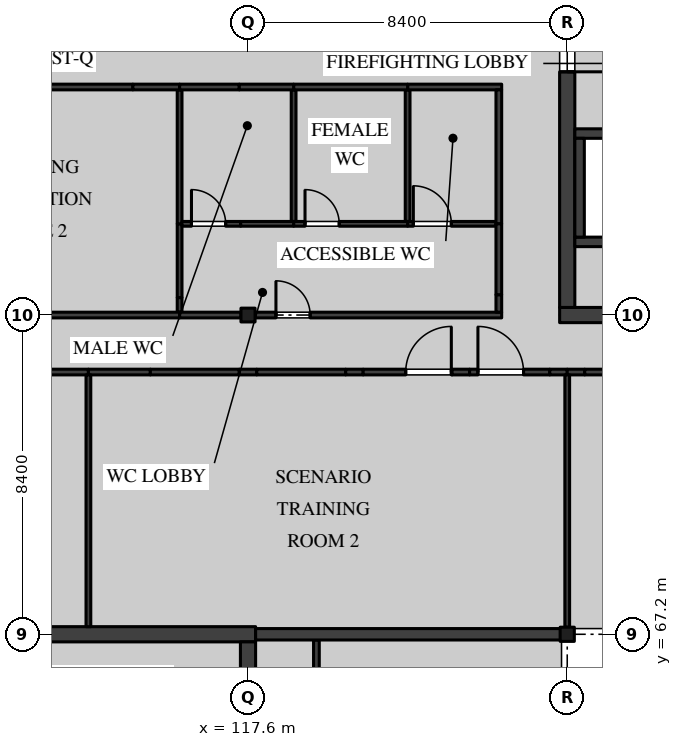
"""IFC4 building model, lengths in metres.
Left out: names, types, materials, properties, quantities, classifications, styles, units other than length and angle.
Written with IfcOpenShell. Run it as: python <this file> out.ifc"""

import sys

from ifc_helpers import new_model, si_unit, direction, frame, frame_2d, origin, origin_2d, place, context, subcontext, project, spatial, rectangle, i_section, extrude, element, fill, save


model = new_model("IFC4")
c1 = context("Model", 3, precision=1e-05, world=origin(), true_north=direction((0.0, 1.0)))
c2 = subcontext(c1, "Body", "Model", "MODEL_VIEW")
j1 = project(units=[si_unit("LENGTHUNIT", "METRE"), si_unit("PLANEANGLEUNIT", "RADIAN")], contexts=[c1])
p1 = place(None, origin())
s1 = spatial("IfcSite", under=j1, at=p1, CompositionType="ELEMENT")
p2 = place(p1, origin())
s2 = spatial("IfcBuilding", under=s1, at=p2, CompositionType="ELEMENT")
p3 = place(p2, frame((0.0, 0.0, 14.4)))
s3 = spatial("IfcBuildingStorey", under=s2, at=p3, CompositionType="ELEMENT", Elevation=14.4)
p4 = place(p3, frame((117.6, 75.6, 0.0), z_axis=(0.0, 0.0, 1.0), x_axis=(1.0, 0.0, 0.0)))
e1 = element("IfcColumn", 1, at=p4, inside=s3, PredefinedType="COLUMN", context=c2, shape_type="SweptSolid", body=[
    extrude(i_section(OverallWidth=0.371, OverallDepth=0.363, WebThickness=0.013, FlangeThickness=0.022, FilletRadius=0.015, at=origin_2d()), origin(), (0.0, 0.0, 1.0), 4.37),
])
p5 = place(p3, frame((126.0, 67.2, 0.0), z_axis=(0.0, 0.0, 1.0), x_axis=(1.0, 0.0, 0.0)))
e2 = element("IfcColumn", 2, at=p5, inside=s3, PredefinedType="COLUMN", context=c2, shape_type="SweptSolid", body=[
    extrude(i_section(OverallWidth=0.373, OverallDepth=0.373, WebThickness=0.016, FlangeThickness=0.026, FilletRadius=0.015, at=origin_2d()), origin(), (0.0, 0.0, 1.0), 4.37),
])
p6 = place(p3, frame((109.0, 67.2, 0.0), z_axis=(0.0, 0.0, 1.0), x_axis=(1.0, 0.0, 0.0)))
e3 = element("IfcWall", 3, at=p6, inside=s3, PredefinedType="SHEAR", context=c2, shape_type="SweptSolid", body=[
    extrude(rectangle(XDim=8.8, YDim=0.4, at=frame_2d((4.4, 0.0))), origin(), (0.0, 0.0, 1.0), 4.37),
])
p7 = place(p3, frame((117.6, 59.0, 0.0), z_axis=(0.0, 0.0, 1.0), x_axis=(0.0, 1.0, 0.0)))
e4 = element("IfcWall", 4, at=p7, inside=s3, PredefinedType="SHEAR", context=c2, shape_type="SweptSolid", body=[
    extrude(rectangle(XDim=8.0, YDim=0.4, at=frame_2d((4.0, 0.0))), origin(), (0.0, 0.0, 1.0), 4.37),
])
p8 = place(p7, frame((2.925, 0.0, 0.0)))
e5 = element("IfcOpeningElement", 5, at=p8, cuts=e4, PredefinedType="OPENING", context=c2, shape_type="SweptSolid", body=[
    extrude(rectangle(XDim=1.2, YDim=2.1, at=frame_2d((0.6, 1.05))), frame((0.0, 0.21, 0.0), z_axis=(0.0, -1.0, 0.0), x_axis=(1.0, 0.0, 0.0)), (0.0, 0.0, 1.0), 0.42),
])
p9 = place(p3, frame((125.8, 75.6, 0.0), z_axis=(0.0, 0.0, 1.0), x_axis=(1.0, 0.0, 0.0)))
e6 = element("IfcWall", 6, at=p9, inside=s3, PredefinedType="SHEAR", context=c2, shape_type="SweptSolid", body=[
    extrude(rectangle(XDim=8.8, YDim=0.4, at=frame_2d((4.4, 0.0))), origin(), (0.0, 0.0, 1.0), 4.37),
])
p10 = place(p3, frame((126.0, 75.8, 0.0), z_axis=(0.0, 0.0, 1.0), x_axis=(0.0, 1.0, 0.0)))
e7 = element("IfcWall", 7, at=p10, inside=s3, PredefinedType="SHEAR", context=c2, shape_type="SweptSolid", body=[
    extrude(rectangle(XDim=8.0, YDim=0.4, at=frame_2d((4.0, 0.0))), origin(), (0.0, 0.0, 1.0), 4.37),
])
p11 = place(p10, frame((6.2, 0.0, 0.0)))
e8 = element("IfcOpeningElement", 8, at=p11, cuts=e7, PredefinedType="OPENING", context=c2, shape_type="SweptSolid", body=[
    extrude(rectangle(XDim=1.2, YDim=2.1, at=frame_2d((0.6, 1.05))), frame((0.0, 0.21, 0.0), z_axis=(0.0, -1.0, 0.0), x_axis=(1.0, 0.0, 0.0)), (0.0, 0.0, 1.0), 0.42),
])
p12 = place(p3, frame((126.2, 80.375, 0.0), z_axis=(0.0, 0.0, 1.0), x_axis=(1.0, 0.0, 0.0)))
e9 = element("IfcWall", 9, at=p12, inside=s3, PredefinedType="SOLIDWALL", context=c2, shape_type="SweptSolid", body=[
    extrude(rectangle(XDim=3.05, YDim=0.25, at=frame_2d((1.525, 0.0))), origin(), (0.0, 0.0, 1.0), 4.37),
])
p13 = place(p12, frame((0.975, 0.0, 0.0)))
e10 = element("IfcOpeningElement", 10, at=p13, cuts=e9, PredefinedType="OPENING", context=c2, shape_type="SweptSolid", body=[
    extrude(rectangle(XDim=1.1, YDim=2.1, at=frame_2d((0.55, 1.05))), frame((0.0, 0.135, 0.0), z_axis=(0.0, -1.0, 0.0), x_axis=(1.0, 0.0, 0.0)), (0.0, 0.0, 1.0), 0.27),
])
p14 = place(p3, frame((126.2, 77.525, 0.0), z_axis=(0.0, 0.0, 1.0), x_axis=(1.0, 0.0, 0.0)))
e11 = element("IfcWall", 11, at=p14, inside=s3, PredefinedType="SOLIDWALL", context=c2, shape_type="SweptSolid", body=[
    extrude(rectangle(XDim=3.05, YDim=0.25, at=frame_2d((1.525, 0.0))), origin(), (0.0, 0.0, 1.0), 4.37),
])
p15 = place(p3, frame((126.325, 77.65, 0.0), z_axis=(0.0, 0.0, 1.0), x_axis=(0.0, 1.0, 0.0)))
e12 = element("IfcWall", 12, at=p15, inside=s3, PredefinedType="SOLIDWALL", context=c2, shape_type="SweptSolid", body=[
    extrude(rectangle(XDim=2.6, YDim=0.25, at=frame_2d((1.3, 0.0))), origin(), (0.0, 0.0, 1.0), 4.37),
])
p16 = place(p3, frame((119.4, 59.03, 0.0), z_axis=(0.0, 0.0, 1.0), x_axis=(0.0, 1.0, 0.0)))
e13 = element("IfcWall", 13, at=p16, inside=s3, PredefinedType="PARTITIONING", context=c2, shape_type="SweptSolid", body=[
    extrude(rectangle(XDim=8.02, YDim=0.15, at=frame_2d((4.01, 0.0))), origin(), (0.0, 0.0, 1.0), 4.37),
])
p17 = place(p16, frame((0.17, 0.0, 0.0)))
e14 = element("IfcOpeningElement", 14, at=p17, cuts=e13, PredefinedType="OPENING", context=c2, shape_type="SweptSolid", body=[
    extrude(rectangle(XDim=1.35, YDim=2.1, at=frame_2d((0.675, 1.05))), frame((0.0, 0.085, 0.0), z_axis=(0.0, -1.0, 0.0), x_axis=(1.0, 0.0, 0.0)), (0.0, 0.0, 1.0), 0.17),
])
p18 = place(p3, frame((115.8, 75.675, 0.0), z_axis=(0.0, 0.0, 1.0), x_axis=(0.0, 1.0, 0.0)))
e15 = element("IfcWall", 15, at=p18, inside=s3, PredefinedType="PARTITIONING", context=c2, shape_type="SweptSolid", body=[
    extrude(rectangle(XDim=0.385, YDim=0.125, at=frame_2d((0.192, 0.0))), origin(), (0.0, 0.0, 1.0), 3.746),
])
p19 = place(p3, frame((115.8, 76.06, 0.0), z_axis=(0.0, 0.0, 1.0), x_axis=(0.0, 1.0, 0.0)))
e16 = element("IfcWall", 16, at=p19, inside=s3, PredefinedType="PARTITIONING", context=c2, shape_type="SweptSolid", body=[
    extrude(rectangle(XDim=1.94, YDim=0.125, at=frame_2d((0.97, 0.0))), origin(), (0.0, 0.0, 1.0), 4.37),
])
p20 = place(p3, frame((115.8, 78.0, 0.0), z_axis=(0.0, 0.0, 1.0), x_axis=(0.0, 1.0, 0.0)))
e17 = element("IfcWall", 17, at=p20, inside=s3, PredefinedType="PARTITIONING", context=c2, shape_type="SweptSolid", body=[
    extrude(rectangle(XDim=3.525, YDim=0.125, at=frame_2d((1.762, 0.0))), origin(), (0.0, 0.0, 1.0), 4.37),
])
p21 = place(p3, frame((109.386, 75.6, 0.0), z_axis=(0.0, 0.0, 1.0), x_axis=(1.0, 0.0, 0.0)))
e18 = element("IfcWall", 18, at=p21, inside=s3, PredefinedType="PARTITIONING", context=c2, shape_type="SweptSolid", body=[
    extrude(rectangle(XDim=6.414, YDim=0.15, at=frame_2d((3.207, 0.0))), origin(), (0.0, 0.0, 1.0), 3.746),
])
p22 = place(p3, frame((112.23, 81.6, 0.0), z_axis=(0.0, 0.0, 1.0), x_axis=(1.0, 0.0, 0.0)))
e19 = element("IfcWall", 19, at=p22, inside=s3, PredefinedType="PARTITIONING", context=c2, shape_type="SweptSolid", body=[
    extrude(rectangle(XDim=2.34, YDim=0.15, at=frame_2d((1.17, 0.0))), origin(), (0.0, 0.0, 1.0), 4.37),
])
p23 = place(p3, frame((114.57, 81.6, 0.0), z_axis=(0.0, 0.0, 1.0), x_axis=(1.0, 0.0, 0.0)))
e20 = element("IfcWall", 20, at=p23, inside=s3, PredefinedType="PARTITIONING", context=c2, shape_type="SweptSolid", body=[
    extrude(rectangle(XDim=1.23, YDim=0.15, at=frame_2d((0.615, 0.0))), origin(), (0.0, 0.0, 1.0), 3.895),
])
p24 = place(p3, frame((121.8, 78.062, 0.0), z_axis=(0.0, 0.0, 1.0), x_axis=(0.0, 1.0, 0.0)))
e21 = element("IfcWall", 21, at=p24, inside=s3, PredefinedType="PARTITIONING", context=c2, shape_type="SweptSolid", body=[
    extrude(rectangle(XDim=3.463, YDim=0.125, at=frame_2d((1.731, 0.0))), origin(), (0.0, 0.0, 1.0), 4.37),
])
p25 = place(p3, frame((121.8, 78.0, 0.0), z_axis=(0.0, 0.0, 1.0), x_axis=(1.0, 0.0, 0.0)))
e22 = element("IfcWall", 22, at=p25, inside=s3, PredefinedType="PARTITIONING", context=c2, shape_type="SweptSolid", body=[
    extrude(rectangle(XDim=2.325, YDim=0.125, at=frame_2d((1.163, 0.0))), origin(), (0.0, 0.0, 1.0), 3.895),
])
p26 = place(p25, frame((0.15, 0.0, 0.0)))
e23 = element("IfcOpeningElement", 23, at=p26, cuts=e22, PredefinedType="OPENING", context=c2, shape_type="SweptSolid", body=[
    extrude(rectangle(XDim=1.0, YDim=2.1, at=frame_2d((0.5, 1.05))), frame((0.0, 0.073, 0.0), z_axis=(0.0, -1.0, 0.0), x_axis=(1.0, 0.0, 0.0)), (0.0, 0.0, 1.0), 0.145),
])
p27 = place(p3, frame((121.8, 81.6, 0.0), z_axis=(0.0, 0.0, 1.0), x_axis=(1.0, 0.0, 0.0)))
e24 = element("IfcWall", 24, at=p27, inside=s3, PredefinedType="PARTITIONING", context=c2, shape_type="SweptSolid", body=[
    extrude(rectangle(XDim=2.475, YDim=0.15, at=frame_2d((1.237, 0.0))), origin(), (0.0, 0.0, 1.0), 3.895),
])
p28 = place(p3, frame((124.2, 78.0, 0.0), z_axis=(0.0, 0.0, 1.0), x_axis=(0.0, 1.0, 0.0)))
e25 = element("IfcWall", 25, at=p28, inside=s3, PredefinedType="PARTITIONING", context=c2, shape_type="SweptSolid", body=[
    extrude(rectangle(XDim=3.525, YDim=0.15, at=frame_2d((1.762, 0.0))), origin(), (0.0, 0.0, 1.0), 4.37),
])
p29 = place(p3, frame((118.8, 78.0, 0.0), z_axis=(0.0, 0.0, 1.0), x_axis=(1.0, 0.0, 0.0)))
e26 = element("IfcWall", 26, at=p29, inside=s3, PredefinedType="PARTITIONING", context=c2, shape_type="SweptSolid", body=[
    extrude(rectangle(XDim=3.0, YDim=0.125, at=frame_2d((1.5, 0.0))), origin(), (0.0, 0.0, 1.0), 3.895),
])
p30 = place(p29, frame((0.3, 0.0, 0.0)))
e27 = element("IfcOpeningElement", 27, at=p30, cuts=e26, PredefinedType="OPENING", context=c2, shape_type="SweptSolid", body=[
    extrude(rectangle(XDim=0.9, YDim=2.1, at=frame_2d((0.45, 1.05))), frame((0.0, 0.073, 0.0), z_axis=(0.0, -1.0, 0.0), x_axis=(1.0, 0.0, 0.0)), (0.0, 0.0, 1.0), 0.145),
])
p31 = place(p3, frame((118.8, 78.062, 0.0), z_axis=(0.0, 0.0, 1.0), x_axis=(0.0, 1.0, 0.0)))
e28 = element("IfcWall", 28, at=p31, inside=s3, PredefinedType="PARTITIONING", context=c2, shape_type="SweptSolid", body=[
    extrude(rectangle(XDim=3.463, YDim=0.125, at=frame_2d((1.731, 0.0))), origin(), (0.0, 0.0, 1.0), 4.37),
])
p32 = place(p3, frame((118.8, 81.6, 0.0), z_axis=(0.0, 0.0, 1.0), x_axis=(1.0, 0.0, 0.0)))
e29 = element("IfcWall", 29, at=p32, inside=s3, PredefinedType="PARTITIONING", context=c2, shape_type="SweptSolid", body=[
    extrude(rectangle(XDim=3.0, YDim=0.15, at=frame_2d((1.5, 0.0))), origin(), (0.0, 0.0, 1.0), 3.895),
])
p33 = place(p3, frame((115.862, 78.0, 0.0), z_axis=(0.0, 0.0, 1.0), x_axis=(1.0, 0.0, 0.0)))
e30 = element("IfcWall", 30, at=p33, inside=s3, PredefinedType="PARTITIONING", context=c2, shape_type="SweptSolid", body=[
    extrude(rectangle(XDim=1.545, YDim=0.125, at=frame_2d((0.772, 0.0))), origin(), (0.0, 0.0, 1.0), 4.37),
])
p34 = place(p33, frame((0.25, 0.0, 0.0)))
e31 = element("IfcOpeningElement", 31, at=p34, cuts=e30, PredefinedType="OPENING", context=c2, shape_type="SweptSolid", body=[
    extrude(rectangle(XDim=0.9, YDim=2.1, at=frame_2d((0.45, 1.05))), frame((0.0, 0.073, 0.0), z_axis=(0.0, -1.0, 0.0), x_axis=(1.0, 0.0, 0.0)), (0.0, 0.0, 1.0), 0.145),
])
p35 = place(p3, frame((117.407, 78.0, 0.0), z_axis=(0.0, 0.0, 1.0), x_axis=(1.0, 0.0, 0.0)))
e32 = element("IfcWall", 32, at=p35, inside=s3, PredefinedType="PARTITIONING", context=c2, shape_type="SweptSolid", body=[
    extrude(rectangle(XDim=1.393, YDim=0.125, at=frame_2d((0.697, 0.0))), origin(), (0.0, 0.0, 1.0), 3.746),
])
p36 = place(p3, frame((115.8, 75.6, 0.0), z_axis=(0.0, 0.0, 1.0), x_axis=(1.0, 0.0, 0.0)))
e33 = element("IfcWall", 33, at=p36, inside=s3, PredefinedType="PARTITIONING", context=c2, shape_type="SweptSolid", body=[
    extrude(rectangle(XDim=1.614, YDim=0.15, at=frame_2d((0.807, 0.0))), origin(), (0.0, 0.0, 1.0), 3.746),
])
p37 = place(p3, frame((117.785, 75.6, 0.0), z_axis=(0.0, 0.0, 1.0), x_axis=(1.0, 0.0, 0.0)))
e34 = element("IfcWall", 34, at=p37, inside=s3, PredefinedType="PARTITIONING", context=c2, shape_type="SweptSolid", body=[
    extrude(rectangle(XDim=6.49, YDim=0.15, at=frame_2d((3.245, 0.0))), origin(), (0.0, 0.0, 1.0), 3.746),
])
p38 = place(p37, frame((0.55, 0.0, 0.0)))
e35 = element("IfcOpeningElement", 35, at=p38, cuts=e34, PredefinedType="OPENING", context=c2, shape_type="SweptSolid", body=[
    extrude(rectangle(XDim=0.9, YDim=2.1, at=frame_2d((0.45, 1.05))), frame((0.0, 0.085, 0.0), z_axis=(0.0, -1.0, 0.0), x_axis=(1.0, 0.0, 0.0)), (0.0, 0.0, 1.0), 0.17),
])
p39 = place(p3, frame((124.2, 75.675, 0.0), z_axis=(0.0, 0.0, 1.0), x_axis=(0.0, 1.0, 0.0)))
e36 = element("IfcWall", 36, at=p39, inside=s3, PredefinedType="PARTITIONING", context=c2, shape_type="SweptSolid", body=[
    extrude(rectangle(XDim=0.46, YDim=0.15, at=frame_2d((0.23, 0.0))), origin(), (0.0, 0.0, 1.0), 3.746),
])
p40 = place(p3, frame((124.2, 76.135, 0.0), z_axis=(0.0, 0.0, 1.0), x_axis=(0.0, 1.0, 0.0)))
e37 = element("IfcWall", 37, at=p40, inside=s3, PredefinedType="PARTITIONING", context=c2, shape_type="SweptSolid", body=[
    extrude(rectangle(XDim=1.865, YDim=0.15, at=frame_2d((0.933, 0.0))), origin(), (0.0, 0.0, 1.0), 4.37),
])
p41 = place(p3, frame((115.8, 81.6, 0.0), z_axis=(0.0, 0.0, 1.0), x_axis=(1.0, 0.0, 0.0)))
e38 = element("IfcWall", 38, at=p41, inside=s3, PredefinedType="PARTITIONING", context=c2, shape_type="SweptSolid", body=[
    extrude(rectangle(XDim=1.57, YDim=0.15, at=frame_2d((0.785, 0.0))), origin(), (0.0, 0.0, 1.0), 4.37),
])
p42 = place(p3, frame((117.37, 81.6, 0.0), z_axis=(0.0, 0.0, 1.0), x_axis=(1.0, 0.0, 0.0)))
e39 = element("IfcWall", 39, at=p42, inside=s3, PredefinedType="PARTITIONING", context=c2, shape_type="SweptSolid", body=[
    extrude(rectangle(XDim=1.43, YDim=0.15, at=frame_2d((0.715, 0.0))), origin(), (0.0, 0.0, 1.0), 3.746),
])
p43 = place(p3, frame((111.77, 74.1, 0.0), z_axis=(0.0, 0.0, 1.0), x_axis=(1.0, 0.0, 0.0)))
e40 = element("IfcWall", 40, at=p43, inside=s3, PredefinedType="PARTITIONING", context=c2, shape_type="SweptSolid", body=[
    extrude(rectangle(XDim=1.63, YDim=0.15, at=frame_2d((0.815, 0.0))), origin(), (0.0, 0.0, 1.0), 3.895),
])
p44 = place(p3, frame((113.4, 74.1, 0.0), z_axis=(0.0, 0.0, 1.0), x_axis=(1.0, 0.0, 0.0)))
e41 = element("IfcWall", 41, at=p44, inside=s3, PredefinedType="PARTITIONING", context=c2, shape_type="SweptSolid", body=[
    extrude(rectangle(XDim=1.63, YDim=0.15, at=frame_2d((0.815, 0.0))), origin(), (0.0, 0.0, 1.0), 3.895),
])
p45 = place(p3, frame((115.03, 74.1, 0.0), z_axis=(0.0, 0.0, 1.0), x_axis=(1.0, 0.0, 0.0)))
e42 = element("IfcWall", 42, at=p45, inside=s3, PredefinedType="PARTITIONING", context=c2, shape_type="SweptSolid", body=[
    extrude(rectangle(XDim=2.34, YDim=0.15, at=frame_2d((1.17, 0.0))), origin(), (0.0, 0.0, 1.0), 4.37),
])
p46 = place(p3, frame((117.37, 74.1, 0.0), z_axis=(0.0, 0.0, 1.0), x_axis=(1.0, 0.0, 0.0)))
e43 = element("IfcWall", 43, at=p46, inside=s3, PredefinedType="PARTITIONING", context=c2, shape_type="SweptSolid", body=[
    extrude(rectangle(XDim=0.46, YDim=0.15, at=frame_2d((0.23, 0.0))), origin(), (0.0, 0.0, 1.0), 3.746),
])
p47 = place(p3, frame((117.83, 74.1, 0.0), z_axis=(0.0, 0.0, 1.0), x_axis=(1.0, 0.0, 0.0)))
e44 = element("IfcWall", 44, at=p47, inside=s3, PredefinedType="PARTITIONING", context=c2, shape_type="SweptSolid", body=[
    extrude(rectangle(XDim=2.34, YDim=0.15, at=frame_2d((1.17, 0.0))), origin(), (0.0, 0.0, 1.0), 4.37),
])
p48 = place(p3, frame((120.17, 74.1, 0.0), z_axis=(0.0, 0.0, 1.0), x_axis=(1.0, 0.0, 0.0)))
e45 = element("IfcWall", 45, at=p48, inside=s3, PredefinedType="PARTITIONING", context=c2, shape_type="SweptSolid", body=[
    extrude(rectangle(XDim=0.46, YDim=0.15, at=frame_2d((0.23, 0.0))), origin(), (0.0, 0.0, 1.0), 3.895),
])
p49 = place(p3, frame((120.63, 74.1, 0.0), z_axis=(0.0, 0.0, 1.0), x_axis=(1.0, 0.0, 0.0)))
e46 = element("IfcWall", 46, at=p49, inside=s3, PredefinedType="PARTITIONING", context=c2, shape_type="SweptSolid", body=[
    extrude(rectangle(XDim=2.34, YDim=0.15, at=frame_2d((1.17, 0.0))), origin(), (0.0, 0.0, 1.0), 4.37),
])
p50 = place(p49, frame((1.12, 0.0, 0.0)))
e47 = element("IfcOpeningElement", 47, at=p50, cuts=e46, PredefinedType="OPENING", context=c2, shape_type="SweptSolid", body=[
    extrude(rectangle(XDim=1.2, YDim=2.4, at=frame_2d((0.6, 1.2))), frame((0.0, 0.085, 0.0), z_axis=(0.0, -1.0, 0.0), x_axis=(1.0, 0.0, 0.0)), (0.0, 0.0, 1.0), 0.17),
])
p51 = place(p3, frame((122.97, 74.1, 0.0), z_axis=(0.0, 0.0, 1.0), x_axis=(1.0, 0.0, 0.0)))
e48 = element("IfcWall", 48, at=p51, inside=s3, PredefinedType="PARTITIONING", context=c2, shape_type="SweptSolid", body=[
    extrude(rectangle(XDim=0.46, YDim=0.15, at=frame_2d((0.23, 0.0))), origin(), (0.0, 0.0, 1.0), 3.895),
])
p52 = place(p3, frame((123.43, 74.1, 0.0), z_axis=(0.0, 0.0, 1.0), x_axis=(1.0, 0.0, 0.0)))
e49 = element("IfcWall", 49, at=p52, inside=s3, PredefinedType="PARTITIONING", context=c2, shape_type="SweptSolid", body=[
    extrude(rectangle(XDim=2.11, YDim=0.15, at=frame_2d((1.055, 0.0))), origin(), (0.0, 0.0, 1.0), 4.37),
])
p53 = place(p52, frame((0.22, 0.0, 0.0)))
e50 = element("IfcOpeningElement", 50, at=p53, cuts=e49, PredefinedType="OPENING", context=c2, shape_type="SweptSolid", body=[
    extrude(rectangle(XDim=1.2, YDim=2.4, at=frame_2d((0.6, 1.2))), frame((0.0, 0.085, 0.0), z_axis=(0.0, -1.0, 0.0), x_axis=(1.0, 0.0, 0.0)), (0.0, 0.0, 1.0), 0.17),
])
for number, where, z_axis, x_axis in (
    (51, (125.54, 74.1, 0.0), (0.0, 0.0, 1.0), (1.0, 0.0, 0.0)),
    (52, (126.0, 74.1, 0.0), (0.0, 0.0, 1.0), (1.0, 0.0, 0.0)),
):
    element("IfcWall", number, at=place(p3, frame(where, z_axis=z_axis, x_axis=x_axis)), inside=s3, PredefinedType="PARTITIONING", context=c2, shape_type="SweptSolid", body=[
        extrude(rectangle(XDim=0.46, YDim=0.15, at=frame_2d((0.23, 0.0))), origin(), (0.0, 0.0, 1.0), 3.746),
    ])
p54 = place(p3, frame((126.46, 74.1, 0.0), z_axis=(0.0, 0.0, 1.0), x_axis=(1.0, 0.0, 0.0)))
e53 = element("IfcWall", 53, at=p54, inside=s3, PredefinedType="PARTITIONING", context=c2, shape_type="SweptSolid", body=[
    extrude(rectangle(XDim=2.11, YDim=0.15, at=frame_2d((1.055, 0.0))), origin(), (0.0, 0.0, 1.0), 4.37),
])
p55 = place(p3, frame((113.4, 67.4, 0.0), z_axis=(0.0, 0.0, 1.0), x_axis=(0.0, 1.0, 0.0)))
e54 = element("IfcWall", 54, at=p55, inside=s3, PredefinedType="PARTITIONING", context=c2, shape_type="SweptSolid", body=[
    extrude(rectangle(XDim=6.625, YDim=0.125, at=frame_2d((3.312, 0.0))), origin(), (0.0, 0.0, 1.0), 4.37),
])
p56 = place(p3, frame((126.0, 67.386, 0.0), z_axis=(0.0, 0.0, 1.0), x_axis=(0.0, 1.0, 0.0)))
e55 = element("IfcWall", 55, at=p56, inside=s3, PredefinedType="PARTITIONING", context=c2, shape_type="SweptSolid", body=[
    extrude(rectangle(XDim=6.639, YDim=0.125, at=frame_2d((3.319, 0.0))), origin(), (0.0, 0.0, 1.0), 3.746),
])
p57 = place(p3, frame((125.998, 67.2, 0.0), z_axis=(0.0, 0.0, 1.0), x_axis=(-1.0, 0.0, 0.0)))
e56 = element("IfcWall", 56, at=p57, inside=s3, PredefinedType="SOLIDWALL", context=c2, shape_type="SweptSolid", body=[
    extrude(rectangle(XDim=8.198, YDim=0.3, at=frame_2d((4.099, 0.0))), origin(), (0.0, 0.0, 1.0), 3.746),
])
p58 = place(p11, frame((1.2, 0.0, 0.0), z_axis=(0.0, 0.0, 1.0), x_axis=(-1.0, 0.0, 0.0)))
e57 = element("IfcDoor", 57, at=p58, inside=s3, OperationType="SINGLE_SWING_LEFT", PredefinedType="DOOR", context=c2, shape_type="SweptSolid", body=[
    extrude(rectangle(XDim=1.2, YDim=2.1, at=frame_2d((0.6, 1.05))), frame((0.0, 0.035, 0.0), z_axis=(0.0, -1.0, 0.0), x_axis=(1.0, 0.0, 0.0)), (0.0, 0.0, 1.0), 0.07),
])
fill(e8, e57)
p59 = place(p26, origin())
e58 = element("IfcDoor", 58, at=p59, inside=s3, OperationType="SINGLE_SWING_RIGHT", PredefinedType="DOOR", context=c2, shape_type="SweptSolid", body=[
    extrude(rectangle(XDim=1.0, YDim=2.1, at=frame_2d((0.5, 1.05))), frame((0.0, 0.02, 0.0), z_axis=(0.0, -1.0, 0.0), x_axis=(1.0, 0.0, 0.0)), (0.0, 0.0, 1.0), 0.04),
])
fill(e23, e58)
p60 = place(p30, origin())
e59 = element("IfcDoor", 59, at=p60, inside=s3, OperationType="SINGLE_SWING_RIGHT", PredefinedType="DOOR", context=c2, shape_type="SweptSolid", body=[
    extrude(rectangle(XDim=0.9, YDim=2.1, at=frame_2d((0.45, 1.05))), frame((0.0, 0.02, 0.0), z_axis=(0.0, -1.0, 0.0), x_axis=(1.0, 0.0, 0.0)), (0.0, 0.0, 1.0), 0.04),
])
fill(e27, e59)
p61 = place(p38, origin())
e60 = element("IfcDoor", 60, at=p61, inside=s3, OperationType="SINGLE_SWING_RIGHT", PredefinedType="DOOR", context=c2, shape_type="SweptSolid", body=[
    extrude(rectangle(XDim=0.9, YDim=2.1, at=frame_2d((0.45, 1.05))), frame((0.0, 0.025, 0.0), z_axis=(0.0, -1.0, 0.0), x_axis=(1.0, 0.0, 0.0)), (0.0, 0.0, 1.0), 0.05),
])
fill(e35, e60)
p62 = place(p34, origin())
e61 = element("IfcDoor", 61, at=p62, inside=s3, OperationType="SINGLE_SWING_RIGHT", PredefinedType="DOOR", context=c2, shape_type="SweptSolid", body=[
    extrude(rectangle(XDim=0.9, YDim=2.1, at=frame_2d((0.45, 1.05))), frame((0.0, 0.02, 0.0), z_axis=(0.0, -1.0, 0.0), x_axis=(1.0, 0.0, 0.0)), (0.0, 0.0, 1.0), 0.04),
])
fill(e31, e61)
p63 = place(p50, origin())
e62 = element("IfcDoor", 62, at=p63, inside=s3, OperationType="SINGLE_SWING_LEFT", PredefinedType="DOOR", context=c2, shape_type="SweptSolid", body=[
    extrude(rectangle(XDim=1.2, YDim=2.4, at=frame_2d((0.6, 1.2))), frame((0.0, 0.025, 0.0), z_axis=(0.0, -1.0, 0.0), x_axis=(1.0, 0.0, 0.0)), (0.0, 0.0, 1.0), 0.05),
])
fill(e47, e62)
p64 = place(p53, origin())
e63 = element("IfcDoor", 63, at=p64, inside=s3, OperationType="SINGLE_SWING_RIGHT", PredefinedType="DOOR", context=c2, shape_type="SweptSolid", body=[
    extrude(rectangle(XDim=1.2, YDim=2.4, at=frame_2d((0.6, 1.2))), frame((0.0, 0.025, 0.0), z_axis=(0.0, -1.0, 0.0), x_axis=(1.0, 0.0, 0.0)), (0.0, 0.0, 1.0), 0.05),
])
fill(e50, e63)
save(model, sys.argv[1])
